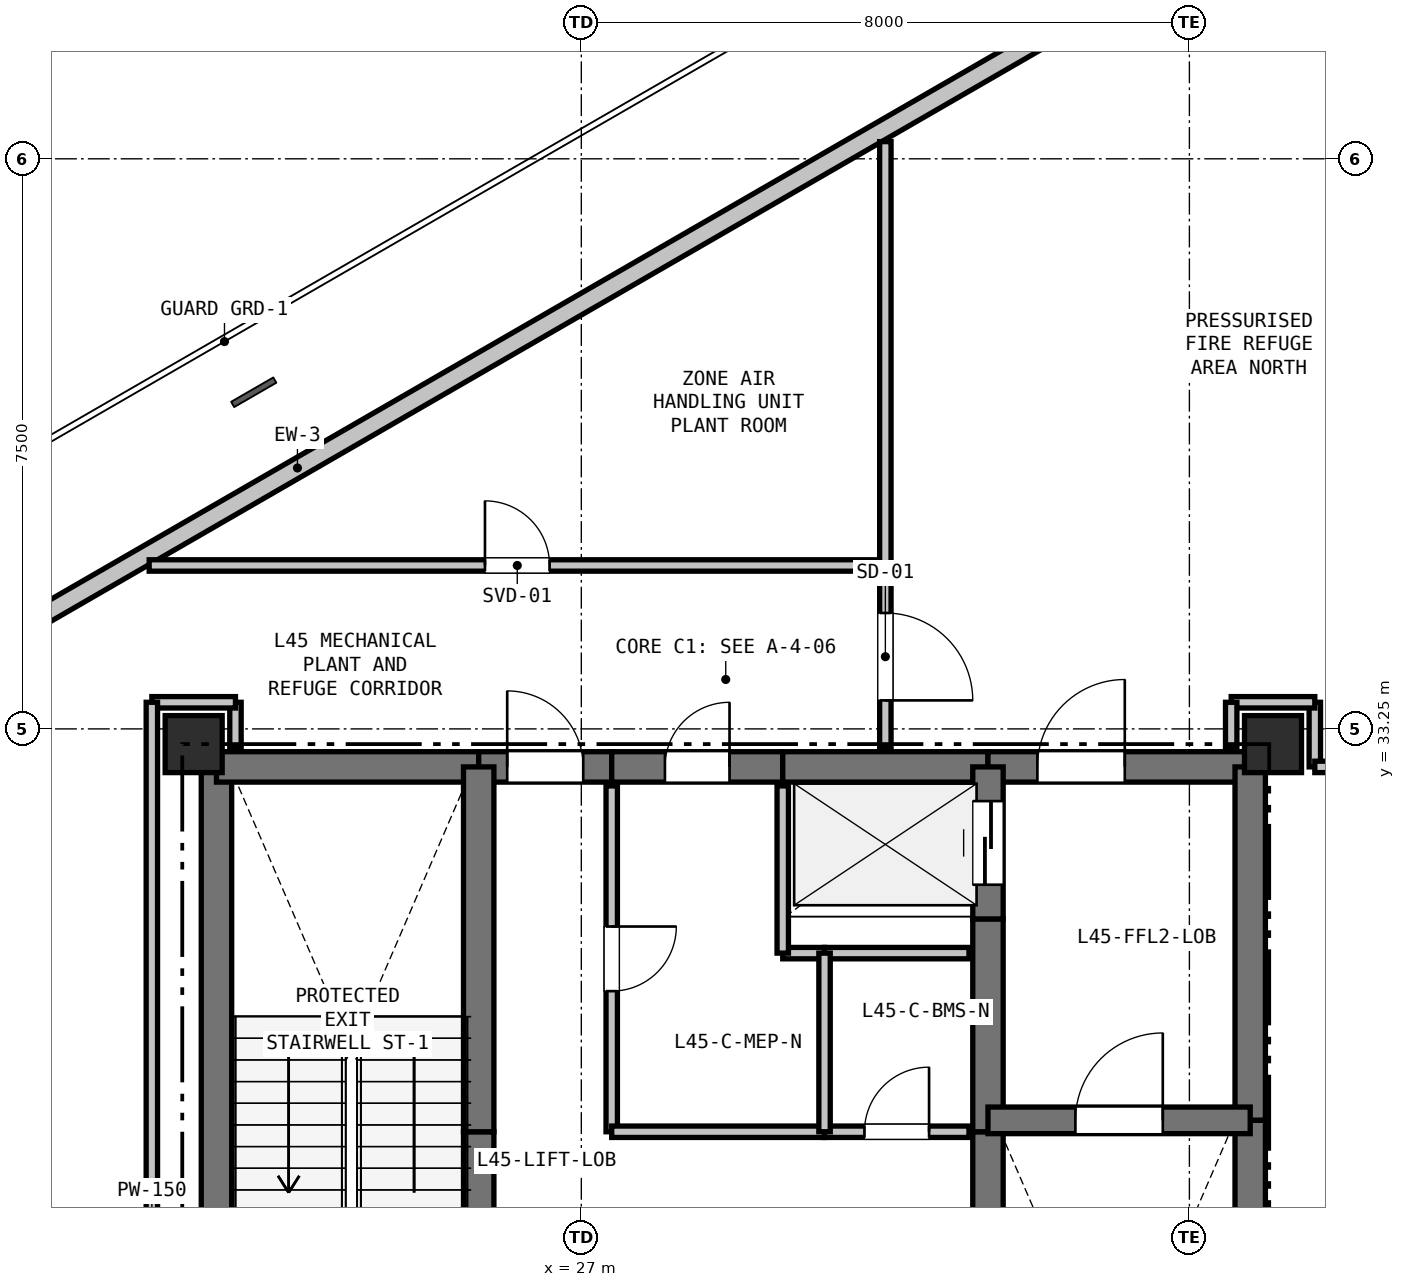
"""IFC4 building model, lengths in metres.
Left out: names, types, materials, properties, quantities, classifications, styles, units other than length and angle.
Written with IfcOpenShell. Run it as: python <this file> out.ifc"""

import sys

from ifc_helpers import new_model, si_unit, direction, frame, frame_2d, origin, origin_2d, place, context, subcontext, project, spatial, rectangle, extrude, element, fill, save


model = new_model("IFC4")
c1 = context("Model", 3, precision=1e-05, world=origin(), true_north=direction((0.0, 1.0)))
c2 = subcontext(c1, "Body", "Model", "MODEL_VIEW")
j1 = project(units=[si_unit("LENGTHUNIT", "METRE"), si_unit("PLANEANGLEUNIT", "RADIAN")], contexts=[c1])
p1 = place(None, origin())
s1 = spatial("IfcSite", under=j1, at=p1, CompositionType="ELEMENT")
p2 = place(p1, origin())
s2 = spatial("IfcBuilding", under=s1, at=p2, CompositionType="ELEMENT")
p3 = place(p2, frame((0.0, 0.0, 160.8)))
s3 = spatial("IfcBuildingStorey", under=s2, at=p3, CompositionType="ELEMENT", Elevation=160.8)
for number, where, z_axis, x_axis in (
    (1, (21.9, 33.05, 0.0), (0.0, 0.0, 1.0), (1.0, 0.0, 0.0)),
    (2, (36.1, 33.05, 0.0), (0.0, 0.0, 1.0), (1.0, 0.0, 0.0)),
):
    element("IfcColumn", number, at=place(p3, frame(where, z_axis=z_axis, x_axis=x_axis)), inside=s3, PredefinedType="COLUMN", context=c2, shape_type="SweptSolid", body=[
        extrude(rectangle(XDim=0.75, YDim=0.75, at=origin_2d()), origin(), (0.0, 0.0, 1.0), 6.6),
    ])
p4 = place(p3, frame((8.31, 28.048, 0.0), z_axis=(0.0, 0.0, 1.0), x_axis=(0.866026432802, 0.499998217685, 0.0)))
e3 = element("IfcWall", 3, at=p4, inside=s3, PredefinedType="SOLIDWALL", context=c2, shape_type="SweptSolid", body=[
    extrude(rectangle(XDim=34.537, YDim=0.25, at=frame_2d((17.269, 0.0))), origin(), (0.0, 0.0, 1.0), 4.755),
])
p5 = place(p3, frame((22.2, 25.4, 0.0), z_axis=(0.0, 0.0, 1.0), x_axis=(0.0, 1.0, 0.0)))
e4 = element("IfcWall", 4, at=p5, inside=s3, PredefinedType="SHEAR", context=c2, shape_type="SweptSolid", body=[
    extrude(rectangle(XDim=7.35, YDim=0.4, at=frame_2d((3.675, 0.0))), origin(), (0.0, 0.0, 1.0), 6.37),
])
p6 = place(p3, frame((22.2, 32.75, 0.0), z_axis=(0.0, 0.0, 1.0), x_axis=(1.0, 0.0, 0.0)))
e5 = element("IfcWall", 5, at=p6, inside=s3, PredefinedType="SHEAR", context=c2, shape_type="SweptSolid", body=[
    extrude(rectangle(XDim=3.45, YDim=0.4, at=frame_2d((1.725, 0.0))), origin(), (0.0, 0.0, 1.0), 6.37),
])
p7 = place(p3, frame((25.65, 32.75, 0.0), z_axis=(0.0, 0.0, 1.0), x_axis=(1.0, 0.0, 0.0)))
e6 = element("IfcWall", 6, at=p7, inside=s3, PredefinedType="SHEAR", context=c2, shape_type="SweptSolid", body=[
    extrude(rectangle(XDim=1.75, YDim=0.4, at=frame_2d((0.875, 0.0))), origin(), (0.0, 0.0, 1.0), 6.37),
])
p8 = place(p7, frame((0.375, 0.0, 0.0)))
e7 = element("IfcOpeningElement", 7, at=p8, cuts=e6, PredefinedType="OPENING", context=c2, shape_type="SweptSolid", body=[
    extrude(rectangle(XDim=1.0, YDim=2.15, at=frame_2d((0.5, 1.075))), frame((0.0, 0.21, 0.0), z_axis=(0.0, -1.0, 0.0), x_axis=(1.0, 0.0, 0.0)), (0.0, 0.0, 1.0), 0.42),
])
p9 = place(p3, frame((27.4, 32.75, 0.0), z_axis=(0.0, 0.0, 1.0), x_axis=(1.0, 0.0, 0.0)))
e8 = element("IfcWall", 8, at=p9, inside=s3, PredefinedType="SHEAR", context=c2, shape_type="SweptSolid", body=[
    extrude(rectangle(XDim=2.25, YDim=0.4, at=frame_2d((1.125, 0.0))), origin(), (0.0, 0.0, 1.0), 6.37),
])
p10 = place(p9, frame((0.7, 0.0, 0.0)))
e9 = element("IfcOpeningElement", 9, at=p10, cuts=e8, PredefinedType="OPENING", context=c2, shape_type="SweptSolid", body=[
    extrude(rectangle(XDim=0.85, YDim=2.1, at=frame_2d((0.425, 1.05))), frame((0.0, 0.21, 0.0), z_axis=(0.0, -1.0, 0.0), x_axis=(1.0, 0.0, 0.0)), (0.0, 0.0, 1.0), 0.42),
])
p11 = place(p3, frame((29.65, 32.75, 0.0), z_axis=(0.0, 0.0, 1.0), x_axis=(1.0, 0.0, 0.0)))
e10 = element("IfcWall", 10, at=p11, inside=s3, PredefinedType="SHEAR", context=c2, shape_type="SweptSolid", body=[
    extrude(rectangle(XDim=2.7, YDim=0.4, at=frame_2d((1.35, 0.0))), origin(), (0.0, 0.0, 1.0), 6.37),
])
p12 = place(p3, frame((32.35, 32.75, 0.0), z_axis=(0.0, 0.0, 1.0), x_axis=(1.0, 0.0, 0.0)))
e11 = element("IfcWall", 11, at=p12, inside=s3, PredefinedType="SHEAR", context=c2, shape_type="SweptSolid", body=[
    extrude(rectangle(XDim=3.45, YDim=0.4, at=frame_2d((1.725, 0.0))), origin(), (0.0, 0.0, 1.0), 6.37),
])
p13 = place(p12, frame((0.65, 0.0, 0.0)))
e12 = element("IfcOpeningElement", 12, at=p13, cuts=e11, PredefinedType="OPENING", context=c2, shape_type="SweptSolid", body=[
    extrude(rectangle(XDim=1.15, YDim=2.15, at=frame_2d((0.575, 1.075))), frame((0.0, 0.21, 0.0), z_axis=(0.0, -1.0, 0.0), x_axis=(1.0, 0.0, 0.0)), (0.0, 0.0, 1.0), 0.42),
])
p14 = place(p3, frame((35.8, 32.75, 0.0), z_axis=(0.0, 0.0, 1.0), x_axis=(0.0, -1.0, 0.0)))
e13 = element("IfcWall", 13, at=p14, inside=s3, PredefinedType="SHEAR", context=c2, shape_type="SweptSolid", body=[
    extrude(rectangle(XDim=4.65, YDim=0.4, at=frame_2d((2.325, 0.0))), origin(), (0.0, 0.0, 1.0), 6.37),
])
p15 = place(p3, frame((35.8, 28.1, 0.0), z_axis=(0.0, 0.0, 1.0), x_axis=(0.0, -1.0, 0.0)))
e14 = element("IfcWall", 14, at=p15, inside=s3, PredefinedType="SHEAR", context=c2, shape_type="SweptSolid", body=[
    extrude(rectangle(XDim=7.35, YDim=0.4, at=frame_2d((3.675, 0.0))), origin(), (0.0, 0.0, 1.0), 6.37),
])
p16 = place(p3, frame((25.65, 25.55, 0.0), z_axis=(0.0, 0.0, 1.0), x_axis=(0.0, 1.0, 0.0)))
e15 = element("IfcWall", 15, at=p16, inside=s3, PredefinedType="SHEAR", context=c2, shape_type="SweptSolid", body=[
    extrude(rectangle(XDim=2.4, YDim=0.4, at=frame_2d((1.2, 0.0))), origin(), (0.0, 0.0, 1.0), 6.37),
])
p17 = place(p3, frame((25.65, 27.95, 0.0), z_axis=(0.0, 0.0, 1.0), x_axis=(0.0, 1.0, 0.0)))
e16 = element("IfcWall", 16, at=p17, inside=s3, PredefinedType="SHEAR", context=c2, shape_type="SweptSolid", body=[
    extrude(rectangle(XDim=4.8, YDim=0.4, at=frame_2d((2.4, 0.0))), origin(), (0.0, 0.0, 1.0), 6.37),
])
p18 = place(p3, frame((32.35, 25.55, 0.0), z_axis=(0.0, 0.0, 1.0), x_axis=(0.0, 1.0, 0.0)))
e17 = element("IfcWall", 17, at=p18, inside=s3, PredefinedType="SHEAR", context=c2, shape_type="SweptSolid", body=[
    extrude(rectangle(XDim=2.4, YDim=0.4, at=frame_2d((1.2, 0.0))), origin(), (0.0, 0.0, 1.0), 6.37),
])
p19 = place(p3, frame((32.35, 27.95, 0.0), z_axis=(0.0, 0.0, 1.0), x_axis=(0.0, 1.0, 0.0)))
e18 = element("IfcWall", 18, at=p19, inside=s3, PredefinedType="SHEAR", context=c2, shape_type="SweptSolid", body=[
    extrude(rectangle(XDim=2.8, YDim=0.4, at=frame_2d((1.4, 0.0))), origin(), (0.0, 0.0, 1.0), 6.37),
])
p20 = place(p3, frame((32.35, 30.75, 0.0), z_axis=(0.0, 0.0, 1.0), x_axis=(0.0, 1.0, 0.0)))
e19 = element("IfcWall", 19, at=p20, inside=s3, PredefinedType="SHEAR", context=c2, shape_type="SweptSolid", body=[
    extrude(rectangle(XDim=2.0, YDim=0.4, at=frame_2d((1.0, 0.0))), origin(), (0.0, 0.0, 1.0), 6.37),
])
p21 = place(p20, frame((0.45, 0.0, 0.0)))
e20 = element("IfcOpeningElement", 20, at=p21, cuts=e19, PredefinedType="OPENING", context=c2, shape_type="SweptSolid", body=[
    extrude(rectangle(XDim=1.1, YDim=2.15, at=frame_2d((0.55, 1.075))), frame((0.0, 0.21, 0.0), z_axis=(0.0, -1.0, 0.0), x_axis=(1.0, 0.0, 0.0)), (0.0, 0.0, 1.0), 0.42),
])
p22 = place(p3, frame((32.35, 28.1, 0.0), z_axis=(0.0, 0.0, 1.0), x_axis=(1.0, 0.0, 0.0)))
e21 = element("IfcWall", 21, at=p22, inside=s3, PredefinedType="SHEAR", context=c2, shape_type="SweptSolid", body=[
    extrude(rectangle(XDim=3.45, YDim=0.35, at=frame_2d((1.725, 0.0))), origin(), (0.0, 0.0, 1.0), 6.37),
])
p23 = place(p22, frame((1.15, 0.0, 0.0)))
e22 = element("IfcOpeningElement", 22, at=p23, cuts=e21, PredefinedType="OPENING", context=c2, shape_type="SweptSolid", body=[
    extrude(rectangle(XDim=1.15, YDim=2.15, at=frame_2d((0.575, 1.075))), frame((0.0, 0.185, 0.0), z_axis=(0.0, -1.0, 0.0), x_axis=(1.0, 0.0, 0.0)), (0.0, 0.0, 1.0), 0.37),
])
p24 = place(p3, frame((32.1, 30.3, 0.0), z_axis=(0.0, 0.0, 1.0), x_axis=(-1.0, 0.0, 0.0)))
e23 = element("IfcWall", 23, at=p24, inside=s3, PredefinedType="PARTITIONING", context=c2, shape_type="SweptSolid", body=[
    extrude(rectangle(XDim=1.9, YDim=0.15, at=frame_2d((0.95, 0.0))), origin(), (0.0, 0.0, 1.0), 6.37),
])
p25 = place(p3, frame((30.2, 30.3, 0.0), z_axis=(0.0, 0.0, 1.0), x_axis=(-1.0, 0.0, 0.0)))
e24 = element("IfcWall", 24, at=p25, inside=s3, PredefinedType="PARTITIONING", context=c2, shape_type="SweptSolid", body=[
    extrude(rectangle(XDim=0.55, YDim=0.15, at=frame_2d((0.275, 0.0))), origin(), (0.0, 0.0, 1.0), 6.37),
])
p26 = place(p3, frame((29.65, 30.3, 0.0), z_axis=(0.0, 0.0, 1.0), x_axis=(0.0, 1.0, 0.0)))
e25 = element("IfcWall", 25, at=p26, inside=s3, PredefinedType="PARTITIONING", context=c2, shape_type="SweptSolid", body=[
    extrude(rectangle(XDim=2.2, YDim=0.15, at=frame_2d((1.1, 0.0))), origin(), (0.0, 0.0, 1.0), 6.37),
])
p27 = place(p3, frame((27.4, 32.5, 0.0), z_axis=(0.0, 0.0, 1.0), x_axis=(0.0, -1.0, 0.0)))
e26 = element("IfcWall", 26, at=p27, inside=s3, PredefinedType="PARTITIONING", context=c2, shape_type="SweptSolid", body=[
    extrude(rectangle(XDim=4.55, YDim=0.15, at=frame_2d((2.275, 0.0))), origin(), (0.0, 0.0, 1.0), 6.37),
])
p28 = place(p27, frame((1.85, 0.0, 0.0)))
e27 = element("IfcOpeningElement", 27, at=p28, cuts=e26, PredefinedType="OPENING", context=c2, shape_type="SweptSolid", body=[
    extrude(rectangle(XDim=0.85, YDim=2.1, at=frame_2d((0.425, 1.05))), frame((0.0, 0.085, 0.0), z_axis=(0.0, -1.0, 0.0), x_axis=(1.0, 0.0, 0.0)), (0.0, 0.0, 1.0), 0.17),
])
p29 = place(p3, frame((27.4, 27.95, 0.0), z_axis=(0.0, 0.0, 1.0), x_axis=(1.0, 0.0, 0.0)))
e28 = element("IfcWall", 28, at=p29, inside=s3, PredefinedType="PARTITIONING", context=c2, shape_type="SweptSolid", body=[
    extrude(rectangle(XDim=2.8, YDim=0.15, at=frame_2d((1.4, 0.0))), origin(), (0.0, 0.0, 1.0), 6.37),
])
p30 = place(p3, frame((30.2, 27.95, 0.0), z_axis=(0.0, 0.0, 1.0), x_axis=(1.0, 0.0, 0.0)))
e29 = element("IfcWall", 29, at=p30, inside=s3, PredefinedType="PARTITIONING", context=c2, shape_type="SweptSolid", body=[
    extrude(rectangle(XDim=1.9, YDim=0.15, at=frame_2d((0.95, 0.0))), origin(), (0.0, 0.0, 1.0), 6.37),
])
p31 = place(p30, frame((0.525, 0.0, 0.0)))
e30 = element("IfcOpeningElement", 30, at=p31, cuts=e29, PredefinedType="OPENING", context=c2, shape_type="SweptSolid", body=[
    extrude(rectangle(XDim=0.85, YDim=2.1, at=frame_2d((0.425, 1.05))), frame((0.0, 0.085, 0.0), z_axis=(0.0, -1.0, 0.0), x_axis=(1.0, 0.0, 0.0)), (0.0, 0.0, 1.0), 0.17),
])
p32 = place(p3, frame((21.315, 35.4, 0.0), z_axis=(0.0, 0.0, 1.0), x_axis=(1.0, 0.0, 0.0)))
e31 = element("IfcWall", 31, at=p32, inside=s3, PredefinedType="PARTITIONING", context=c2, shape_type="SweptSolid", body=[
    extrude(rectangle(XDim=9.685, YDim=0.15, at=frame_2d((4.843, 0.0))), origin(), (0.0, 0.0, 1.0), 5.005),
])
p33 = place(p32, frame((4.417, 0.0, 0.0)))
e32 = element("IfcOpeningElement", 32, at=p33, cuts=e31, PredefinedType="OPENING", context=c2, shape_type="SweptSolid", body=[
    extrude(rectangle(XDim=0.85, YDim=2.1, at=frame_2d((0.425, 1.05))), frame((0.0, 0.085, 0.0), z_axis=(0.0, -1.0, 0.0), x_axis=(1.0, 0.0, 0.0)), (0.0, 0.0, 1.0), 0.17),
])
p34 = place(p3, frame((31.0, 35.4, 0.0), z_axis=(0.0, 0.0, 1.0), x_axis=(0.0, -1.0, 0.0)))
e33 = element("IfcWall", 33, at=p34, inside=s3, PredefinedType="PARTITIONING", context=c2, shape_type="SweptSolid", body=[
    extrude(rectangle(XDim=2.4, YDim=0.15, at=frame_2d((1.2, 0.0))), origin(), (0.0, 0.0, 1.0), 5.005),
])
p35 = place(p34, frame((0.625, 0.0, 0.0)))
e34 = element("IfcOpeningElement", 34, at=p35, cuts=e33, PredefinedType="OPENING", context=c2, shape_type="SweptSolid", body=[
    extrude(rectangle(XDim=1.15, YDim=2.15, at=frame_2d((0.575, 1.075))), frame((0.0, 0.085, 0.0), z_axis=(0.0, -1.0, 0.0), x_axis=(1.0, 0.0, 0.0)), (0.0, 0.0, 1.0), 0.17),
])
p36 = place(p3, frame((22.45, 33.0, 0.0), z_axis=(0.0, 0.0, 1.0), x_axis=(0.0, 1.0, 0.0)))
e35 = element("IfcWall", 35, at=p36, inside=s3, PredefinedType="PARTITIONING", context=c2, shape_type="SweptSolid", body=[
    extrude(rectangle(XDim=0.6, YDim=0.15, at=frame_2d((0.3, 0.0))), origin(), (0.0, 0.0, 1.0), 5.895),
])
p37 = place(p3, frame((22.45, 33.6, 0.0), z_axis=(0.0, 0.0, 1.0), x_axis=(-1.0, 0.0, 0.0)))
e36 = element("IfcWall", 36, at=p37, inside=s3, PredefinedType="PARTITIONING", context=c2, shape_type="SweptSolid", body=[
    extrude(rectangle(XDim=1.1, YDim=0.15, at=frame_2d((0.55, 0.0))), origin(), (0.0, 0.0, 1.0), 6.37),
])
p38 = place(p3, frame((21.35, 33.6, 0.0), z_axis=(0.0, 0.0, 1.0), x_axis=(0.0, -1.0, 0.0)))
e37 = element("IfcWall", 37, at=p38, inside=s3, PredefinedType="PARTITIONING", context=c2, shape_type="SweptSolid", body=[
    extrude(rectangle(XDim=13.7, YDim=0.15, at=frame_2d((6.85, 0.0))), origin(), (0.0, 0.0, 1.0), 4.755),
])
p39 = place(p3, frame((30.2, 30.3, 0.0), z_axis=(0.0, 0.0, 1.0), x_axis=(0.0, -1.0, 0.0)))
e38 = element("IfcWall", 38, at=p39, inside=s3, PredefinedType="PARTITIONING", context=c2, shape_type="SweptSolid", body=[
    extrude(rectangle(XDim=2.35, YDim=0.15, at=frame_2d((1.175, 0.0))), origin(), (0.0, 0.0, 1.0), 6.37),
])
p40 = place(p3, frame((36.65, 32.75, 0.0), z_axis=(0.0, 0.0, 1.0), x_axis=(0.0, 1.0, 0.0)))
e39 = element("IfcWall", 39, at=p40, inside=s3, PredefinedType="PARTITIONING", context=c2, shape_type="SweptSolid", body=[
    extrude(rectangle(XDim=0.85, YDim=0.15, at=frame_2d((0.425, 0.0))), origin(), (0.0, 0.0, 1.0), 5.005),
])
p41 = place(p3, frame((36.65, 33.6, 0.0), z_axis=(0.0, 0.0, 1.0), x_axis=(-1.0, 0.0, 0.0)))
e40 = element("IfcWall", 40, at=p41, inside=s3, PredefinedType="PARTITIONING", context=c2, shape_type="SweptSolid", body=[
    extrude(rectangle(XDim=1.1, YDim=0.15, at=frame_2d((0.55, 0.0))), origin(), (0.0, 0.0, 1.0), 5.005),
])
p42 = place(p3, frame((35.55, 33.6, 0.0), z_axis=(0.0, 0.0, 1.0), x_axis=(0.0, -1.0, 0.0)))
e41 = element("IfcWall", 41, at=p42, inside=s3, PredefinedType="PARTITIONING", context=c2, shape_type="SweptSolid", body=[
    extrude(rectangle(XDim=0.6, YDim=0.15, at=frame_2d((0.3, 0.0))), origin(), (0.0, 0.0, 1.0), 5.005),
])
p43 = place(p3, frame((31.0, 35.4, 0.0), z_axis=(0.0, 0.0, 1.0), x_axis=(0.0, 1.0, 0.0)))
e42 = element("IfcWall", 42, at=p43, inside=s3, PredefinedType="PARTITIONING", context=c2, shape_type="SweptSolid", body=[
    extrude(rectangle(XDim=5.576, YDim=0.15, at=frame_2d((2.788, 0.0))), origin(), (0.0, 0.0, 1.0), 5.005),
])
p44 = place(p3, frame((40.32, 32.75, 0.0), z_axis=(0.0, 0.0, 1.0), x_axis=(-1.0, 0.0, 0.0)))
e43 = element("IfcWall", 43, at=p44, inside=s3, PredefinedType="PARTITIONING", context=c2, shape_type="SweptSolid", body=[
    extrude(rectangle(XDim=3.67, YDim=0.15, at=frame_2d((1.835, 0.0))), origin(), (0.0, 0.0, 1.0), 6.37),
])
p45 = place(p8, origin())
e44 = element("IfcDoor", 44, at=p45, inside=s3, OperationType="SINGLE_SWING_LEFT", PredefinedType="DOOR", context=c2, shape_type="SweptSolid", body=[
    extrude(rectangle(XDim=1.0, YDim=2.15, at=frame_2d((0.5, 1.075))), frame((0.0, 0.025, 0.0), z_axis=(0.0, -1.0, 0.0), x_axis=(1.0, 0.0, 0.0)), (0.0, 0.0, 1.0), 0.05),
])
fill(e7, e44)
p46 = place(p21, origin())
e45 = element("IfcDoor", 45, at=p46, inside=s3, OperationType="SLIDING_TO_LEFT", PredefinedType="DOOR", context=c2, shape_type="SweptSolid", body=[
    extrude(rectangle(XDim=1.1, YDim=2.15, at=frame_2d((0.55, 1.075))), frame((0.0, 0.025, 0.0), z_axis=(0.0, -1.0, 0.0), x_axis=(1.0, 0.0, 0.0)), (0.0, 0.0, 1.0), 0.05),
])
fill(e20, e45)
p47 = place(p23, origin())
e46 = element("IfcDoor", 46, at=p47, inside=s3, OperationType="SINGLE_SWING_RIGHT", PredefinedType="DOOR", context=c2, shape_type="SweptSolid", body=[
    extrude(rectangle(XDim=1.15, YDim=2.15, at=frame_2d((0.575, 1.075))), frame((0.0, 0.025, 0.0), z_axis=(0.0, -1.0, 0.0), x_axis=(1.0, 0.0, 0.0)), (0.0, 0.0, 1.0), 0.05),
])
fill(e22, e46)
p48 = place(p13, origin())
e47 = element("IfcDoor", 47, at=p48, inside=s3, OperationType="SINGLE_SWING_RIGHT", PredefinedType="DOOR", context=c2, shape_type="SweptSolid", body=[
    extrude(rectangle(XDim=1.15, YDim=2.15, at=frame_2d((0.575, 1.075))), frame((0.0, 0.025, 0.0), z_axis=(0.0, -1.0, 0.0), x_axis=(1.0, 0.0, 0.0)), (0.0, 0.0, 1.0), 0.05),
])
fill(e12, e47)
p49 = place(p28, origin())
e48 = element("IfcDoor", 48, at=p49, inside=s3, OperationType="SINGLE_SWING_LEFT", PredefinedType="DOOR", context=c2, shape_type="SweptSolid", body=[
    extrude(rectangle(XDim=0.85, YDim=2.1, at=frame_2d((0.425, 1.05))), frame((0.0, 0.025, 0.0), z_axis=(0.0, -1.0, 0.0), x_axis=(1.0, 0.0, 0.0)), (0.0, 0.0, 1.0), 0.05),
])
fill(e27, e48)
p50 = place(p31, origin())
e49 = element("IfcDoor", 49, at=p50, inside=s3, OperationType="SINGLE_SWING_RIGHT", PredefinedType="DOOR", context=c2, shape_type="SweptSolid", body=[
    extrude(rectangle(XDim=0.85, YDim=2.1, at=frame_2d((0.425, 1.05))), frame((0.0, 0.025, 0.0), z_axis=(0.0, -1.0, 0.0), x_axis=(1.0, 0.0, 0.0)), (0.0, 0.0, 1.0), 0.05),
])
fill(e30, e49)
p51 = place(p10, origin())
e50 = element("IfcDoor", 50, at=p51, inside=s3, OperationType="SINGLE_SWING_RIGHT", PredefinedType="DOOR", context=c2, shape_type="SweptSolid", body=[
    extrude(rectangle(XDim=0.85, YDim=2.1, at=frame_2d((0.425, 1.05))), frame((0.0, 0.025, 0.0), z_axis=(0.0, -1.0, 0.0), x_axis=(1.0, 0.0, 0.0)), (0.0, 0.0, 1.0), 0.05),
])
fill(e9, e50)
p52 = place(p35, origin())
e51 = element("IfcDoor", 51, at=p52, inside=s3, OperationType="SINGLE_SWING_RIGHT", PredefinedType="DOOR", context=c2, shape_type="SweptSolid", body=[
    extrude(rectangle(XDim=1.15, YDim=2.15, at=frame_2d((0.575, 1.075))), frame((0.0, 0.025, 0.0), z_axis=(0.0, -1.0, 0.0), x_axis=(1.0, 0.0, 0.0)), (0.0, 0.0, 1.0), 0.05),
])
fill(e34, e51)
p53 = place(p33, origin())
e52 = element("IfcDoor", 52, at=p53, inside=s3, OperationType="SINGLE_SWING_LEFT", PredefinedType="DOOR", context=c2, shape_type="SweptSolid", body=[
    extrude(rectangle(XDim=0.85, YDim=2.1, at=frame_2d((0.425, 1.05))), frame((0.0, 0.025, 0.0), z_axis=(0.0, -1.0, 0.0), x_axis=(1.0, 0.0, 0.0)), (0.0, 0.0, 1.0), 0.05),
])
fill(e32, e52)
save(model, sys.argv[1])
